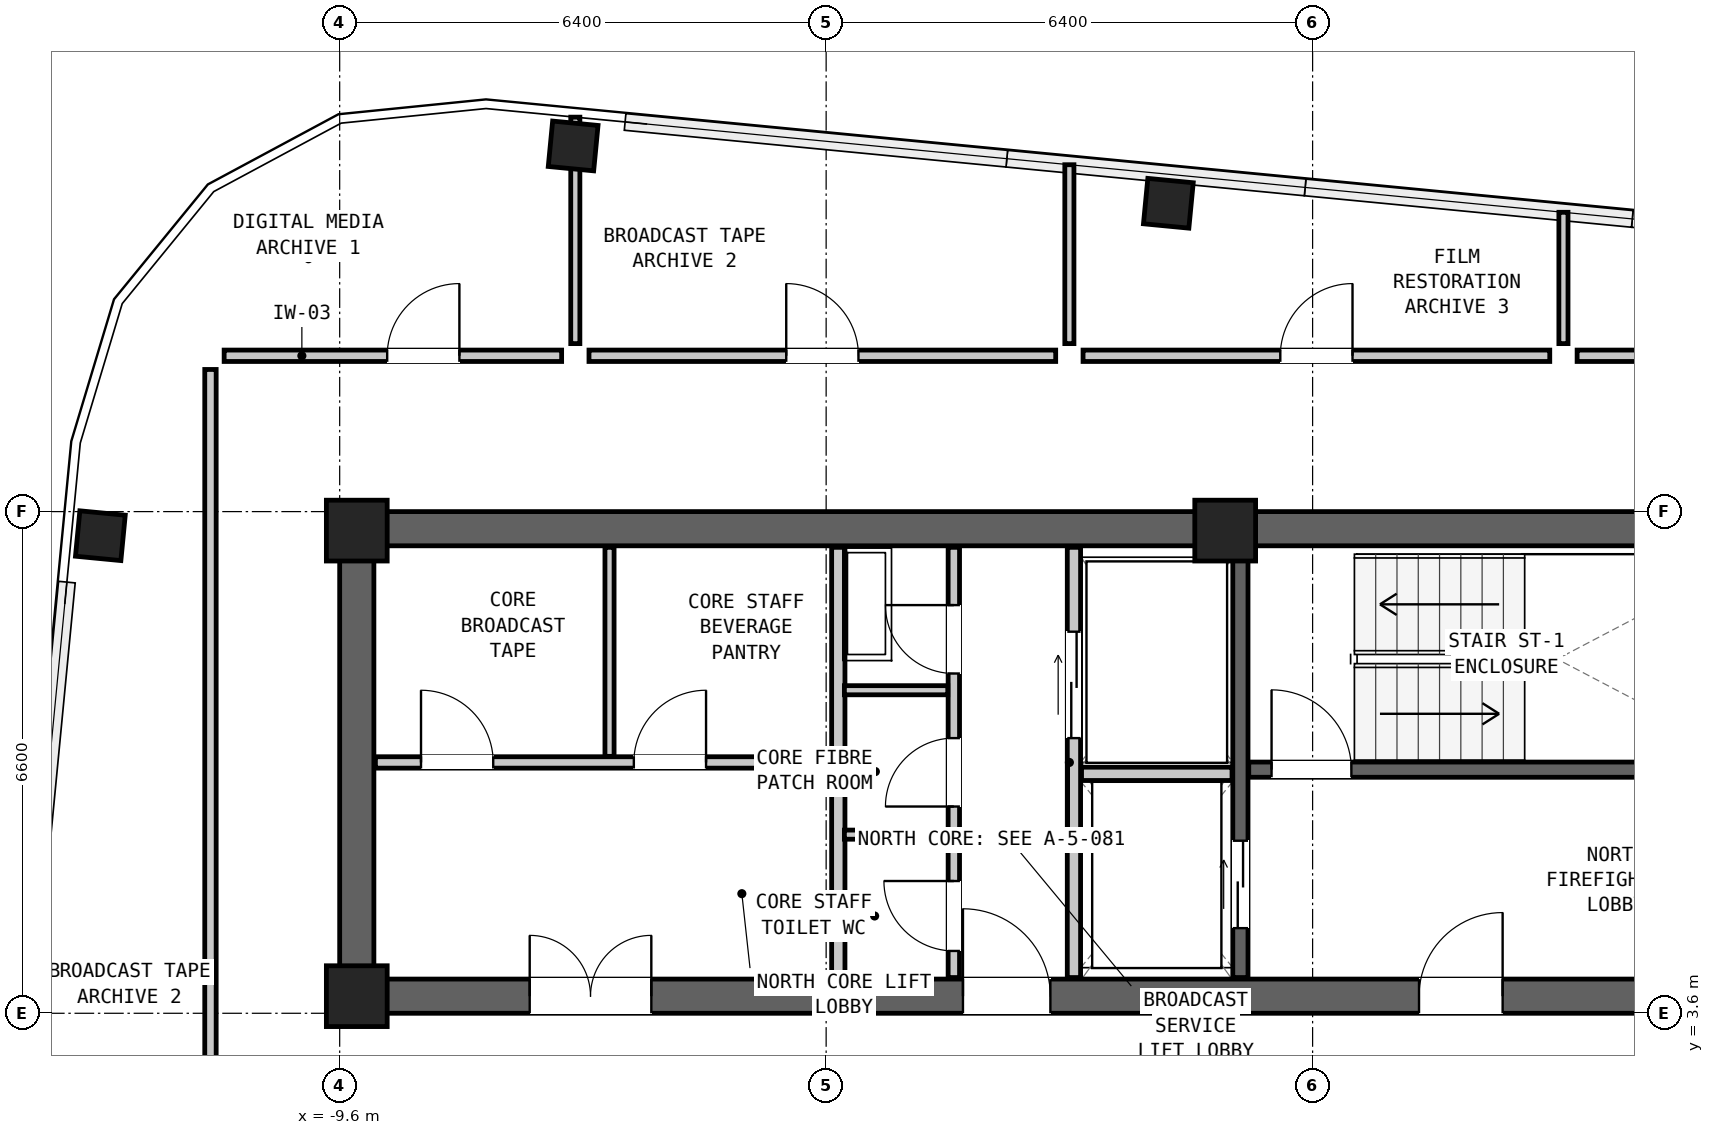
"""IFC4 building model, lengths in metres.
Left out: names, types, materials, properties, quantities, classifications, styles, units other than length and angle.
Written with IfcOpenShell. Run it as: python <this file> out.ifc"""

import sys

from ifc_helpers import new_model, si_unit, direction, frame, frame_2d, origin, origin_2d, place, context, subcontext, project, spatial, rectangle, hollow_rectangle, extrude, element, fill, save


model = new_model("IFC4")
c1 = context("Model", 3, precision=1e-05, world=origin(), true_north=direction((0.0, 1.0)))
c2 = subcontext(c1, "Body", "Model", "MODEL_VIEW")
j1 = project(units=[si_unit("LENGTHUNIT", "METRE"), si_unit("PLANEANGLEUNIT", "RADIAN")], contexts=[c1])
p1 = place(None, origin())
s1 = spatial("IfcSite", under=j1, at=p1, CompositionType="ELEMENT")
p2 = place(p1, origin())
s2 = spatial("IfcBuilding", under=s1, at=p2, CompositionType="ELEMENT")
p3 = place(p2, frame((0.0, 0.0, 264.2)))
s3 = spatial("IfcBuildingStorey", under=s2, at=p3, CompositionType="ELEMENT", Elevation=264.2)
p4 = place(p3, frame((-9.6, 9.975, 0.0), z_axis=(0.0, 0.0, 1.0), x_axis=(1.0, 0.0, 0.0)))
e1 = element("IfcWall", 1, at=p4, inside=s3, PredefinedType="SHEAR", context=c2, shape_type="SweptSolid", body=[
    extrude(rectangle(XDim=19.2, YDim=0.45, at=frame_2d((9.6, 0.0))), origin(), (0.0, 0.0, 1.0), 3.05),
])
p5 = place(p3, frame((-9.6, 3.825, 0.0), z_axis=(0.0, 0.0, 1.0), x_axis=(1.0, 0.0, 0.0)))
e2 = element("IfcWall", 2, at=p5, inside=s3, PredefinedType="SHEAR", context=c2, shape_type="SweptSolid", body=[
    extrude(rectangle(XDim=19.2, YDim=0.45, at=frame_2d((9.6, 0.0))), origin(), (0.0, 0.0, 1.0), 3.05),
])
p6 = place(p5, frame((14.2, 0.0, 0.0)))
e3 = element("IfcOpeningElement", 3, at=p6, cuts=e2, PredefinedType="OPENING", context=c2, shape_type="SweptSolid", body=[
    extrude(rectangle(XDim=1.1, YDim=2.08, at=frame_2d((0.55, 1.04))), frame((0.0, 0.237, 0.0), z_axis=(0.0, -1.0, 0.0), x_axis=(1.0, 0.0, 0.0)), (0.0, 0.0, 1.0), 0.474),
])
p7 = place(p5, frame((8.2, 0.0, 0.0)))
e4 = element("IfcOpeningElement", 4, at=p7, cuts=e2, PredefinedType="OPENING", context=c2, shape_type="SweptSolid", body=[
    extrude(rectangle(XDim=1.15, YDim=2.1, at=frame_2d((0.575, 1.05))), frame((0.0, 0.237, 0.0), z_axis=(0.0, -1.0, 0.0), x_axis=(1.0, 0.0, 0.0)), (0.0, 0.0, 1.0), 0.474),
])
p8 = place(p5, frame((2.5, 0.0, 0.0)))
e5 = element("IfcOpeningElement", 5, at=p8, cuts=e2, PredefinedType="OPENING", context=c2, shape_type="SweptSolid", body=[
    extrude(rectangle(XDim=1.6, YDim=2.12, at=frame_2d((0.8, 1.06))), frame((0.0, 0.237, 0.0), z_axis=(0.0, -1.0, 0.0), x_axis=(1.0, 0.0, 0.0)), (0.0, 0.0, 1.0), 0.474),
])
p9 = place(p3, frame((-9.375, 3.6, 0.0), z_axis=(0.0, 0.0, 1.0), x_axis=(0.0, 1.0, 0.0)))
e6 = element("IfcWall", 6, at=p9, inside=s3, PredefinedType="SHEAR", context=c2, shape_type="SweptSolid", body=[
    extrude(rectangle(XDim=6.6, YDim=0.45, at=frame_2d((3.3, 0.0))), origin(), (0.0, 0.0, 1.0), 3.05),
])
for number, where, z_axis, x_axis in (
    (7, (1.302, 14.256, 0.0), (0.0, 0.0, 1.0), (0.995, -0.096, 0.0)),
    (8, (-6.528, 15.01, 0.0), (0.0, 0.0, 1.0), (0.995, -0.096, 0.0)),
    (9, (-12.749, 9.883, 0.0), (0.0, 0.0, 1.0), (0.096, 0.995, 0.0)),
):
    element("IfcColumn", number, at=place(p3, frame(where, z_axis=z_axis, x_axis=x_axis)), inside=s3, PredefinedType="COLUMN", context=c2, shape_type="SweptSolid", body=[
        extrude(hollow_rectangle(XDim=0.6, YDim=0.6, WallThickness=0.04, at=origin_2d()), origin(), (0.0, 0.0, 1.0), 3.05),
    ])
for number, where, z_axis, x_axis in (
    (10, (-9.375, 9.95, 0.0), (0.0, 0.0, 1.0), (1.0, 0.0, 0.0)),
    (11, (2.05, 9.95, 0.0), (0.0, 0.0, 1.0), (1.0, 0.0, 0.0)),
    (12, (-9.375, 3.825, 0.0), (0.0, 0.0, 1.0), (1.0, 0.0, 0.0)),
):
    element("IfcColumn", number, at=place(p3, frame(where, z_axis=z_axis, x_axis=x_axis)), inside=s3, PredefinedType="COLUMN", context=c2, shape_type="SweptSolid", body=[
        extrude(rectangle(XDim=0.8, YDim=0.8, at=origin_2d()), origin(), (0.0, 0.0, 1.0), 3.05),
    ])
p10 = place(p3, frame((2.36, 6.805, 0.0), z_axis=(0.0, 0.0, 1.0), x_axis=(1.0, 0.0, 0.0)))
e13 = element("IfcWall", 13, at=p10, inside=s3, PredefinedType="SHEAR", context=c2, shape_type="SweptSolid", body=[
    extrude(rectangle(XDim=6.77, YDim=0.2, at=frame_2d((3.385, 0.0))), origin(), (0.0, 0.0, 1.0), 2.86),
])
p11 = place(p10, frame((0.3, 0.0, 0.0)))
e14 = element("IfcOpeningElement", 14, at=p11, cuts=e13, PredefinedType="OPENING", context=c2, shape_type="SweptSolid", body=[
    extrude(rectangle(XDim=1.05, YDim=2.08, at=frame_2d((0.525, 1.04))), frame((0.0, 0.112, 0.0), z_axis=(0.0, -1.0, 0.0), x_axis=(1.0, 0.0, 0.0)), (0.0, 0.0, 1.0), 0.224),
])
p12 = place(p3, frame((2.25, 4.07, 0.0), z_axis=(0.0, 0.0, 1.0), x_axis=(0.0, 1.0, 0.0)))
e15 = element("IfcWall", 15, at=p12, inside=s3, PredefinedType="SHEAR", context=c2, shape_type="SweptSolid", body=[
    extrude(rectangle(XDim=5.66, YDim=0.2, at=frame_2d((2.83, 0.0))), origin(), (0.0, 0.0, 1.0), 2.86),
])
p13 = place(p12, frame((0.65, 0.0, 0.0)))
e16 = element("IfcOpeningElement", 16, at=p13, cuts=e15, PredefinedType="OPENING", context=c2, shape_type="SweptSolid", body=[
    extrude(rectangle(XDim=1.15, YDim=2.08, at=frame_2d((0.575, 1.04))), frame((0.0, 0.112, 0.0), z_axis=(0.0, -1.0, 0.0), x_axis=(1.0, 0.0, 0.0)), (0.0, 0.0, 1.0), 0.224),
])
p14 = place(p3, frame((0.06, 4.07, 0.0), z_axis=(0.0, 0.0, 1.0), x_axis=(0.0, 1.0, 0.0)))
e17 = element("IfcWall", 17, at=p14, inside=s3, PredefinedType="PARTITIONING", context=c2, shape_type="SweptSolid", body=[
    extrude(rectangle(XDim=5.66, YDim=0.175, at=frame_2d((2.83, 0.0))), origin(), (0.0, 0.0, 1.0), 2.86),
])
p15 = place(p14, frame((3.15, 0.0, 0.0)))
e18 = element("IfcOpeningElement", 18, at=p15, cuts=e17, PredefinedType="OPENING", context=c2, shape_type="SweptSolid", body=[
    extrude(rectangle(XDim=1.4, YDim=2.12, at=frame_2d((0.7, 1.06))), frame((0.0, 0.1, 0.0), z_axis=(0.0, -1.0, 0.0), x_axis=(1.0, 0.0, 0.0)), (0.0, 0.0, 1.0), 0.199),
])
p16 = place(p3, frame((0.16, 6.75, 0.0), z_axis=(0.0, 0.0, 1.0), x_axis=(1.0, 0.0, 0.0)))
e19 = element("IfcWall", 19, at=p16, inside=s3, PredefinedType="PARTITIONING", context=c2, shape_type="SweptSolid", body=[
    extrude(rectangle(XDim=1.98, YDim=0.175, at=frame_2d((0.99, 0.0))), origin(), (0.0, 0.0, 1.0), 2.86),
])
p17 = place(p3, frame((-3.04, 4.07, 0.0), z_axis=(0.0, 0.0, 1.0), x_axis=(0.0, 1.0, 0.0)))
e20 = element("IfcWall", 20, at=p17, inside=s3, PredefinedType="PARTITIONING", context=c2, shape_type="SweptSolid", body=[
    extrude(rectangle(XDim=5.66, YDim=0.175, at=frame_2d((2.83, 0.0))), origin(), (0.0, 0.0, 1.0), 2.86),
])
p18 = place(p3, frame((-1.52, 4.07, 0.0), z_axis=(0.0, 0.0, 1.0), x_axis=(0.0, 1.0, 0.0)))
e21 = element("IfcWall", 21, at=p18, inside=s3, PredefinedType="PARTITIONING", context=c2, shape_type="SweptSolid", body=[
    extrude(rectangle(XDim=5.66, YDim=0.15, at=frame_2d((2.83, 0.0))), origin(), (0.0, 0.0, 1.0), 2.86),
])
p19 = place(p18, frame((4.0, 0.0, 0.0)))
e22 = element("IfcOpeningElement", 22, at=p19, cuts=e21, PredefinedType="OPENING", context=c2, shape_type="SweptSolid", body=[
    extrude(rectangle(XDim=0.9, YDim=2.05, at=frame_2d((0.45, 1.025))), frame((0.0, 0.087, 0.0), z_axis=(0.0, -1.0, 0.0), x_axis=(1.0, 0.0, 0.0)), (0.0, 0.0, 1.0), 0.174),
])
p20 = place(p18, frame((2.25, 0.0, 0.0)))
e23 = element("IfcOpeningElement", 23, at=p20, cuts=e21, PredefinedType="OPENING", context=c2, shape_type="SweptSolid", body=[
    extrude(rectangle(XDim=0.9, YDim=2.05, at=frame_2d((0.45, 1.025))), frame((0.0, 0.087, 0.0), z_axis=(0.0, -1.0, 0.0), x_axis=(1.0, 0.0, 0.0)), (0.0, 0.0, 1.0), 0.174),
])
p21 = place(p18, frame((0.35, 0.0, 0.0)))
e24 = element("IfcOpeningElement", 24, at=p21, cuts=e21, PredefinedType="OPENING", context=c2, shape_type="SweptSolid", body=[
    extrude(rectangle(XDim=0.92, YDim=2.1, at=frame_2d((0.46, 1.05))), frame((0.0, 0.087, 0.0), z_axis=(0.0, -1.0, 0.0), x_axis=(1.0, 0.0, 0.0)), (0.0, 0.0, 1.0), 0.174),
])
for number, where, z_axis, x_axis in (
    (25, (-2.96, 5.95, 0.0), (0.0, 0.0, 1.0), (1.0, 0.0, 0.0)),
    (26, (-2.96, 7.85, 0.0), (0.0, 0.0, 1.0), (1.0, 0.0, 0.0)),
):
    element("IfcWall", number, at=place(p3, frame(where, z_axis=z_axis, x_axis=x_axis)), inside=s3, PredefinedType="PARTITIONING", context=c2, shape_type="SweptSolid", body=[
        extrude(rectangle(XDim=1.36, YDim=0.12, at=frame_2d((0.68, 0.0))), origin(), (0.0, 0.0, 1.0), 2.86),
    ])
p22 = place(p3, frame((-9.13, 6.9, 0.0), z_axis=(0.0, 0.0, 1.0), x_axis=(1.0, 0.0, 0.0)))
e27 = element("IfcWall", 27, at=p22, inside=s3, PredefinedType="PARTITIONING", context=c2, shape_type="SweptSolid", body=[
    extrude(rectangle(XDim=6.01, YDim=0.15, at=frame_2d((3.005, 0.0))), origin(), (0.0, 0.0, 1.0), 2.86),
])
p23 = place(p22, frame((0.6, 0.0, 0.0)))
e28 = element("IfcOpeningElement", 28, at=p23, cuts=e27, PredefinedType="OPENING", context=c2, shape_type="SweptSolid", body=[
    extrude(rectangle(XDim=0.95, YDim=2.1, at=frame_2d((0.475, 1.05))), frame((0.0, 0.087, 0.0), z_axis=(0.0, -1.0, 0.0), x_axis=(1.0, 0.0, 0.0)), (0.0, 0.0, 1.0), 0.174),
])
p24 = place(p22, frame((3.4, 0.0, 0.0)))
e29 = element("IfcOpeningElement", 29, at=p24, cuts=e27, PredefinedType="OPENING", context=c2, shape_type="SweptSolid", body=[
    extrude(rectangle(XDim=0.95, YDim=2.1, at=frame_2d((0.475, 1.05))), frame((0.0, 0.087, 0.0), z_axis=(0.0, -1.0, 0.0), x_axis=(1.0, 0.0, 0.0)), (0.0, 0.0, 1.0), 0.174),
])
p25 = place(p3, frame((-6.05, 6.98, 0.0), z_axis=(0.0, 0.0, 1.0), x_axis=(0.0, 1.0, 0.0)))
e30 = element("IfcWall", 30, at=p25, inside=s3, PredefinedType="PARTITIONING", context=c2, shape_type="SweptSolid", body=[
    extrude(rectangle(XDim=2.75, YDim=0.12, at=frame_2d((1.375, 0.0))), origin(), (0.0, 0.0, 1.0), 2.86),
])
p26 = place(p3, frame((-6.5, 12.41, 0.0), z_axis=(0.0, 0.0, 1.0), x_axis=(0.0, 1.0, 0.0)))
e31 = element("IfcWall", 31, at=p26, inside=s3, PredefinedType="PARTITIONING", context=c2, shape_type="SweptSolid", body=[
    extrude(rectangle(XDim=2.979, YDim=0.12, at=frame_2d((1.49, 0.0))), origin(), (0.0, 0.0, 1.0), 2.381),
])
p27 = place(p3, frame((0.0, 12.41, 0.0), z_axis=(0.0, 0.0, 1.0), x_axis=(0.0, 1.0, 0.0)))
e32 = element("IfcWall", 32, at=p27, inside=s3, PredefinedType="PARTITIONING", context=c2, shape_type="SweptSolid", body=[
    extrude(rectangle(XDim=2.354, YDim=0.12, at=frame_2d((1.177, 0.0))), origin(), (0.0, 0.0, 1.0), 2.381),
])
p28 = place(p3, frame((6.5, 12.41, 0.0), z_axis=(0.0, 0.0, 1.0), x_axis=(0.0, 1.0, 0.0)))
e33 = element("IfcWall", 33, at=p28, inside=s3, PredefinedType="PARTITIONING", context=c2, shape_type="SweptSolid", body=[
    extrude(rectangle(XDim=1.728, YDim=0.12, at=frame_2d((0.864, 0.0))), origin(), (0.0, 0.0, 1.0), 2.381),
])
p29 = place(p3, frame((-11.12, 12.25, 0.0), z_axis=(0.0, 0.0, 1.0), x_axis=(1.0, 0.0, 0.0)))
e34 = element("IfcWall", 34, at=p29, inside=s3, PredefinedType="PARTITIONING", context=c2, shape_type="SweptSolid", body=[
    extrude(rectangle(XDim=4.44, YDim=0.15, at=frame_2d((2.22, 0.0))), origin(), (0.0, 0.0, 1.0), 2.86),
])
p30 = place(p29, frame((2.145, 0.0, 0.0)))
e35 = element("IfcOpeningElement", 35, at=p30, cuts=e34, PredefinedType="OPENING", context=c2, shape_type="SweptSolid", body=[
    extrude(rectangle(XDim=0.95, YDim=2.1, at=frame_2d((0.475, 1.05))), frame((0.0, 0.087, 0.0), z_axis=(0.0, -1.0, 0.0), x_axis=(1.0, 0.0, 0.0)), (0.0, 0.0, 1.0), 0.174),
])
p31 = place(p3, frame((-6.32, 12.25, 0.0), z_axis=(0.0, 0.0, 1.0), x_axis=(1.0, 0.0, 0.0)))
e36 = element("IfcWall", 36, at=p31, inside=s3, PredefinedType="PARTITIONING", context=c2, shape_type="SweptSolid", body=[
    extrude(rectangle(XDim=6.14, YDim=0.15, at=frame_2d((3.07, 0.0))), origin(), (0.0, 0.0, 1.0), 2.86),
])
p32 = place(p31, frame((2.595, 0.0, 0.0)))
e37 = element("IfcOpeningElement", 37, at=p32, cuts=e36, PredefinedType="OPENING", context=c2, shape_type="SweptSolid", body=[
    extrude(rectangle(XDim=0.95, YDim=2.1, at=frame_2d((0.475, 1.05))), frame((0.0, 0.087, 0.0), z_axis=(0.0, -1.0, 0.0), x_axis=(1.0, 0.0, 0.0)), (0.0, 0.0, 1.0), 0.174),
])
p33 = place(p3, frame((0.18, 12.25, 0.0), z_axis=(0.0, 0.0, 1.0), x_axis=(1.0, 0.0, 0.0)))
e38 = element("IfcWall", 38, at=p33, inside=s3, PredefinedType="PARTITIONING", context=c2, shape_type="SweptSolid", body=[
    extrude(rectangle(XDim=6.14, YDim=0.15, at=frame_2d((3.07, 0.0))), origin(), (0.0, 0.0, 1.0), 2.86),
])
p34 = place(p33, frame((2.595, 0.0, 0.0)))
e39 = element("IfcOpeningElement", 39, at=p34, cuts=e38, PredefinedType="OPENING", context=c2, shape_type="SweptSolid", body=[
    extrude(rectangle(XDim=0.95, YDim=2.1, at=frame_2d((0.475, 1.05))), frame((0.0, 0.087, 0.0), z_axis=(0.0, -1.0, 0.0), x_axis=(1.0, 0.0, 0.0)), (0.0, 0.0, 1.0), 0.174),
])
p35 = place(p3, frame((6.68, 12.25, 0.0), z_axis=(0.0, 0.0, 1.0), x_axis=(1.0, 0.0, 0.0)))
e40 = element("IfcWall", 40, at=p35, inside=s3, PredefinedType="PARTITIONING", context=c2, shape_type="SweptSolid", body=[
    extrude(rectangle(XDim=4.79, YDim=0.15, at=frame_2d((2.395, 0.0))), origin(), (0.0, 0.0, 1.0), 2.86),
])
p36 = place(p35, frame((0.92, 0.0, 0.0)))
e41 = element("IfcOpeningElement", 41, at=p36, cuts=e40, PredefinedType="OPENING", context=c2, shape_type="SweptSolid", body=[
    extrude(rectangle(XDim=0.95, YDim=2.1, at=frame_2d((0.475, 1.05))), frame((0.0, 0.087, 0.0), z_axis=(0.0, -1.0, 0.0), x_axis=(1.0, 0.0, 0.0)), (0.0, 0.0, 1.0), 0.174),
])
p37 = place(p3, frame((-11.3, 12.07, 0.0), z_axis=(0.0, 0.0, 1.0), x_axis=(0.0, -1.0, 0.0)))
e42 = element("IfcWall", 42, at=p37, inside=s3, PredefinedType="PARTITIONING", context=c2, shape_type="SweptSolid", body=[
    extrude(rectangle(XDim=11.09, YDim=0.15, at=frame_2d((5.545, 0.0))), origin(), (0.0, 0.0, 1.0), 2.86),
])
p38 = place(p37, frame((9.062, 0.0, 0.0)))
e43 = element("IfcOpeningElement", 43, at=p38, cuts=e42, PredefinedType="OPENING", context=c2, shape_type="SweptSolid", body=[
    extrude(rectangle(XDim=0.95, YDim=2.1, at=frame_2d((0.475, 1.05))), frame((0.0, 0.087, 0.0), z_axis=(0.0, -1.0, 0.0), x_axis=(1.0, 0.0, 0.0)), (0.0, 0.0, 1.0), 0.174),
])
p39 = place(p11, origin())
e44 = element("IfcDoor", 44, at=p39, inside=s3, OperationType="SINGLE_SWING_LEFT", PredefinedType="DOOR", context=c2, shape_type="SweptSolid", body=[
    extrude(rectangle(XDim=1.05, YDim=2.08, at=frame_2d((0.525, 1.04))), frame((0.0, 0.025, 0.0), z_axis=(0.0, -1.0, 0.0), x_axis=(1.0, 0.0, 0.0)), (0.0, 0.0, 1.0), 0.05),
])
fill(e14, e44)
p40 = place(p6, origin())
e45 = element("IfcDoor", 45, at=p40, inside=s3, OperationType="SINGLE_SWING_RIGHT", PredefinedType="DOOR", context=c2, shape_type="SweptSolid", body=[
    extrude(rectangle(XDim=1.1, YDim=2.08, at=frame_2d((0.55, 1.04))), frame((0.0, 0.025, 0.0), z_axis=(0.0, -1.0, 0.0), x_axis=(1.0, 0.0, 0.0)), (0.0, 0.0, 1.0), 0.05),
])
fill(e3, e45)
p41 = place(p13, origin())
e46 = element("IfcDoor", 46, at=p41, inside=s3, OperationType="DOUBLE_DOOR_SLIDING", PredefinedType="DOOR", context=c2, shape_type="SweptSolid", body=[
    extrude(rectangle(XDim=1.15, YDim=2.08, at=frame_2d((0.575, 1.04))), frame((0.0, 0.025, 0.0), z_axis=(0.0, -1.0, 0.0), x_axis=(1.0, 0.0, 0.0)), (0.0, 0.0, 1.0), 0.05),
])
fill(e16, e46)
p42 = place(p15, origin())
e47 = element("IfcDoor", 47, at=p42, inside=s3, OperationType="DOUBLE_DOOR_SLIDING", PredefinedType="DOOR", context=c2, shape_type="SweptSolid", body=[
    extrude(rectangle(XDim=1.4, YDim=2.12, at=frame_2d((0.7, 1.06))), frame((0.0, 0.025, 0.0), z_axis=(0.0, -1.0, 0.0), x_axis=(1.0, 0.0, 0.0)), (0.0, 0.0, 1.0), 0.05),
])
fill(e18, e47)
p43 = place(p7, origin())
e48 = element("IfcDoor", 48, at=p43, inside=s3, OperationType="SINGLE_SWING_LEFT", PredefinedType="DOOR", context=c2, shape_type="SweptSolid", body=[
    extrude(rectangle(XDim=1.15, YDim=2.1, at=frame_2d((0.575, 1.05))), frame((0.0, 0.025, 0.0), z_axis=(0.0, -1.0, 0.0), x_axis=(1.0, 0.0, 0.0)), (0.0, 0.0, 1.0), 0.05),
])
fill(e4, e48)
p44 = place(p19, origin())
e49 = element("IfcDoor", 49, at=p44, inside=s3, OperationType="SINGLE_SWING_RIGHT", PredefinedType="DOOR", context=c2, shape_type="SweptSolid", body=[
    extrude(rectangle(XDim=0.9, YDim=2.05, at=frame_2d((0.45, 1.025))), frame((0.0, 0.025, 0.0), z_axis=(0.0, -1.0, 0.0), x_axis=(1.0, 0.0, 0.0)), (0.0, 0.0, 1.0), 0.05),
])
fill(e22, e49)
p45 = place(p20, origin())
e50 = element("IfcDoor", 50, at=p45, inside=s3, OperationType="SINGLE_SWING_LEFT", PredefinedType="DOOR", context=c2, shape_type="SweptSolid", body=[
    extrude(rectangle(XDim=0.9, YDim=2.05, at=frame_2d((0.45, 1.025))), frame((0.0, 0.025, 0.0), z_axis=(0.0, -1.0, 0.0), x_axis=(1.0, 0.0, 0.0)), (0.0, 0.0, 1.0), 0.05),
])
fill(e23, e50)
p46 = place(p21, origin())
e51 = element("IfcDoor", 51, at=p46, inside=s3, OperationType="SINGLE_SWING_RIGHT", PredefinedType="DOOR", context=c2, shape_type="SweptSolid", body=[
    extrude(rectangle(XDim=0.92, YDim=2.1, at=frame_2d((0.46, 1.05))), frame((0.0, 0.025, 0.0), z_axis=(0.0, -1.0, 0.0), x_axis=(1.0, 0.0, 0.0)), (0.0, 0.0, 1.0), 0.05),
])
fill(e24, e51)
p47 = place(p8, origin())
e52 = element("IfcDoor", 52, at=p47, inside=s3, OperationType="DOUBLE_DOOR_SINGLE_SWING", PredefinedType="DOOR", context=c2, shape_type="SweptSolid", body=[
    extrude(rectangle(XDim=1.6, YDim=2.12, at=frame_2d((0.8, 1.06))), frame((0.0, 0.025, 0.0), z_axis=(0.0, -1.0, 0.0), x_axis=(1.0, 0.0, 0.0)), (0.0, 0.0, 1.0), 0.05),
])
fill(e5, e52)
p48 = place(p23, origin())
e53 = element("IfcDoor", 53, at=p48, inside=s3, OperationType="SINGLE_SWING_LEFT", PredefinedType="DOOR", context=c2, shape_type="SweptSolid", body=[
    extrude(rectangle(XDim=0.95, YDim=2.1, at=frame_2d((0.475, 1.05))), frame((0.0, 0.025, 0.0), z_axis=(0.0, -1.0, 0.0), x_axis=(1.0, 0.0, 0.0)), (0.0, 0.0, 1.0), 0.05),
])
fill(e28, e53)
p49 = place(p24, origin())
e54 = element("IfcDoor", 54, at=p49, inside=s3, OperationType="SINGLE_SWING_RIGHT", PredefinedType="DOOR", context=c2, shape_type="SweptSolid", body=[
    extrude(rectangle(XDim=0.95, YDim=2.1, at=frame_2d((0.475, 1.05))), frame((0.0, 0.025, 0.0), z_axis=(0.0, -1.0, 0.0), x_axis=(1.0, 0.0, 0.0)), (0.0, 0.0, 1.0), 0.05),
])
fill(e29, e54)
p50 = place(p30, origin())
e55 = element("IfcDoor", 55, at=p50, inside=s3, OperationType="SINGLE_SWING_RIGHT", PredefinedType="DOOR", context=c2, shape_type="SweptSolid", body=[
    extrude(rectangle(XDim=0.95, YDim=2.1, at=frame_2d((0.475, 1.05))), frame((0.0, 0.025, 0.0), z_axis=(0.0, -1.0, 0.0), x_axis=(1.0, 0.0, 0.0)), (0.0, 0.0, 1.0), 0.05),
])
fill(e35, e55)
p51 = place(p32, origin())
e56 = element("IfcDoor", 56, at=p51, inside=s3, OperationType="SINGLE_SWING_LEFT", PredefinedType="DOOR", context=c2, shape_type="SweptSolid", body=[
    extrude(rectangle(XDim=0.95, YDim=2.1, at=frame_2d((0.475, 1.05))), frame((0.0, 0.025, 0.0), z_axis=(0.0, -1.0, 0.0), x_axis=(1.0, 0.0, 0.0)), (0.0, 0.0, 1.0), 0.05),
])
fill(e37, e56)
p52 = place(p34, origin())
e57 = element("IfcDoor", 57, at=p52, inside=s3, OperationType="SINGLE_SWING_RIGHT", PredefinedType="DOOR", context=c2, shape_type="SweptSolid", body=[
    extrude(rectangle(XDim=0.95, YDim=2.1, at=frame_2d((0.475, 1.05))), frame((0.0, 0.025, 0.0), z_axis=(0.0, -1.0, 0.0), x_axis=(1.0, 0.0, 0.0)), (0.0, 0.0, 1.0), 0.05),
])
fill(e39, e57)
save(model, sys.argv[1])
